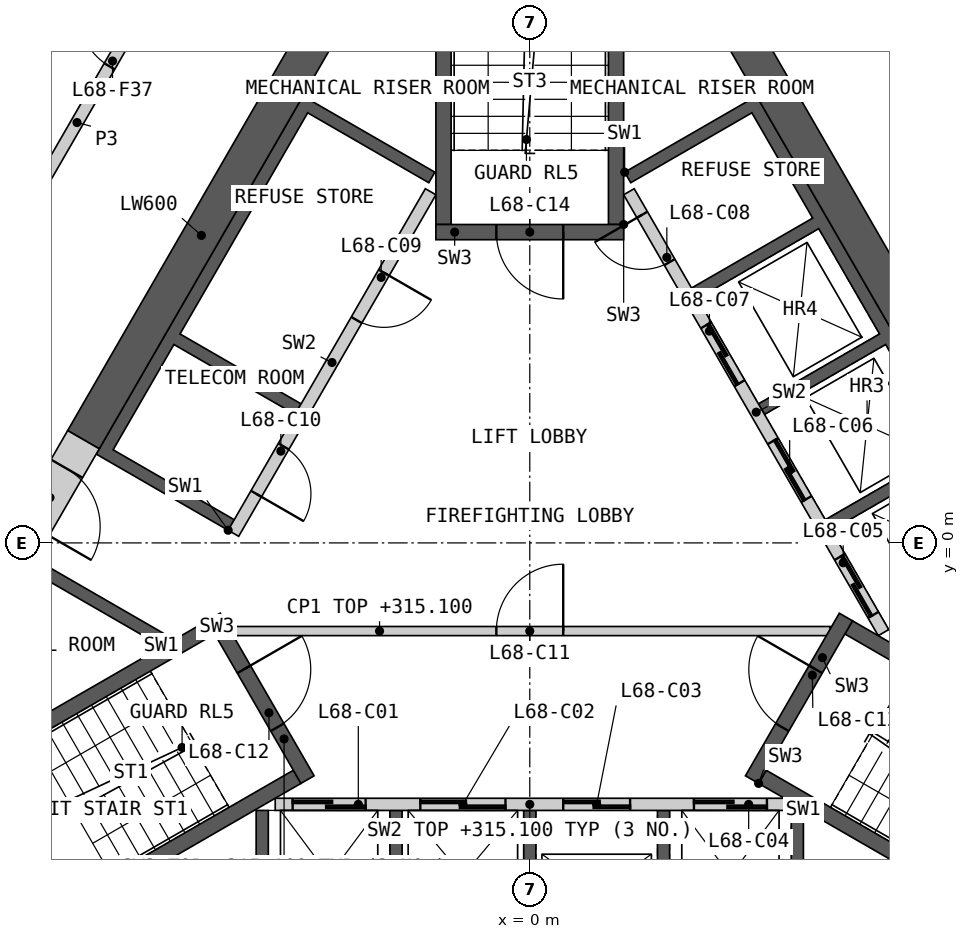
"""IFC4 building model, lengths in metres.
Left out: names, types, materials, properties, quantities, classifications, styles, units other than length and angle.
Written with IfcOpenShell. Run it as: python <this file> out.ifc"""

import sys

from ifc_helpers import new_model, si_unit, direction, frame, frame_2d, origin, place, context, subcontext, project, spatial, polyline, rectangle, outline, extrude, element, fill, save


model = new_model("IFC4")
c1 = context("Model", 3, precision=1e-05, world=origin(), true_north=direction((0.0, 1.0)))
c2 = subcontext(c1, "Body", "Model", "MODEL_VIEW")
j1 = project(units=[si_unit("LENGTHUNIT", "METRE"), si_unit("PLANEANGLEUNIT", "RADIAN")], contexts=[c1])
p1 = place(None, origin())
s1 = spatial("IfcSite", under=j1, at=p1, CompositionType="ELEMENT")
p2 = place(p1, origin())
s2 = spatial("IfcBuilding", under=s1, at=p2, CompositionType="ELEMENT")
p3 = place(p2, frame((0.0, 0.0, 312.0)))
s3 = spatial("IfcBuildingStorey", under=s2, at=p3, CompositionType="ELEMENT", Elevation=312.0)
p4 = place(p3, origin())
e1 = element("IfcWall", 1, at=p4, inside=s3, PredefinedType="SHEAR", context=c2, shape_type="SweptSolid", body=[
    extrude(outline(polyline([(4.5, -4.4), (4.5, -6.906), (-4.5, -6.906), (-4.5, -4.4), (-4.3, -4.4), (-4.3, -6.7), (-2.3, -6.7), (-2.3, -4.4), (-2.1, -4.4), (-2.1, -6.7), (-0.1, -6.7), (-0.1, -4.4), (0.1, -4.4), (0.1, -6.7), (2.1, -6.7), (2.1, -4.4), (2.3, -4.4), (2.3, -6.7), (4.3, -6.7), (4.3, -4.4), (4.5, -4.4)])), origin(), (0.0, 0.0, 1.0), 3.1),
])
p5 = place(p3, frame((-4.187, -4.3, 0.0), z_axis=(0.0, 0.0, 1.0), x_axis=(1.0, 0.0, 0.0)))
e2 = element("IfcWall", 2, at=p5, inside=s3, PredefinedType="SOLIDWALL", context=c2, shape_type="SweptSolid", body=[
    extrude(rectangle(XDim=8.373, YDim=0.2, at=frame_2d((4.187, 0.0))), origin(), (0.0, 0.0, 1.0), 3.1),
])
p6 = place(p5, frame((0.287, 0.0, 0.0)))
e3 = element("IfcOpeningElement", 3, at=p6, cuts=e2, PredefinedType="OPENING", context=c2, shape_type="SweptSolid", body=[
    extrude(rectangle(XDim=1.2, YDim=2.1, at=frame_2d((0.6, 1.05))), frame((0.0, 0.11, 0.0), z_axis=(0.0, -1.0, 0.0), x_axis=(1.0, 0.0, 0.0)), (0.0, 0.0, 1.0), 0.22),
])
p7 = place(p5, frame((2.387, 0.0, 0.0)))
e4 = element("IfcOpeningElement", 4, at=p7, cuts=e2, PredefinedType="OPENING", context=c2, shape_type="SweptSolid", body=[
    extrude(rectangle(XDim=1.4, YDim=2.1, at=frame_2d((0.7, 1.05))), frame((0.0, 0.11, 0.0), z_axis=(0.0, -1.0, 0.0), x_axis=(1.0, 0.0, 0.0)), (0.0, 0.0, 1.0), 0.22),
])
p8 = place(p5, frame((4.737, 0.0, 0.0)))
e5 = element("IfcOpeningElement", 5, at=p8, cuts=e2, PredefinedType="OPENING", context=c2, shape_type="SweptSolid", body=[
    extrude(rectangle(XDim=1.1, YDim=2.1, at=frame_2d((0.55, 1.05))), frame((0.0, 0.11, 0.0), z_axis=(0.0, -1.0, 0.0), x_axis=(1.0, 0.0, 0.0)), (0.0, 0.0, 1.0), 0.22),
])
p9 = place(p5, frame((6.887, 0.0, 0.0)))
e6 = element("IfcOpeningElement", 6, at=p9, cuts=e2, PredefinedType="OPENING", context=c2, shape_type="SweptSolid", body=[
    extrude(rectangle(XDim=1.2, YDim=2.1, at=frame_2d((0.6, 1.05))), frame((0.0, 0.11, 0.0), z_axis=(0.0, -1.0, 0.0), x_axis=(1.0, 0.0, 0.0)), (0.0, 0.0, 1.0), 0.22),
])
p10 = place(p3, origin())
e7 = element("IfcWall", 7, at=p10, inside=s3, PredefinedType="SHEAR", context=c2, shape_type="SweptSolid", body=[
    extrude(outline(polyline([(1.561, 6.097), (3.731, 7.35), (8.231, -0.444), (6.061, -1.697), (5.96, -1.524), (7.952, -0.374), (6.952, 1.358), (4.96, 0.208), (4.861, 0.381), (6.852, 1.531), (5.852, 3.263), (3.861, 2.113), (3.76, 2.287), (5.752, 3.437), (4.752, 5.169), (2.76, 4.019), (2.66, 4.192), (4.652, 5.342), (3.652, 7.074), (1.66, 5.924), (1.561, 6.097)])), origin(), (0.0, 0.0, 1.0), 3.1),
])
p11 = place(p3, frame((5.817, -1.476, 0.0), z_axis=(0.0, 0.0, 1.0), x_axis=(-0.500002616675, 0.866023893041, 0.0)))
e8 = element("IfcWall", 8, at=p11, inside=s3, PredefinedType="SOLIDWALL", context=c2, shape_type="SweptSolid", body=[
    extrude(rectangle(XDim=8.373, YDim=0.2, at=frame_2d((4.187, 0.0))), origin(), (0.0, 0.0, 1.0), 3.1),
])
p12 = place(p11, frame((0.337, 0.0, 0.0)))
e9 = element("IfcOpeningElement", 9, at=p12, cuts=e8, PredefinedType="OPENING", context=c2, shape_type="SweptSolid", body=[
    extrude(rectangle(XDim=1.1, YDim=2.1, at=frame_2d((0.55, 1.05))), frame((0.0, 0.11, 0.0), z_axis=(0.0, -1.0, 0.0), x_axis=(1.0, 0.0, 0.0)), (0.0, 0.0, 1.0), 0.22),
])
p13 = place(p11, frame((2.537, 0.0, 0.0)))
e10 = element("IfcOpeningElement", 10, at=p13, cuts=e8, PredefinedType="OPENING", context=c2, shape_type="SweptSolid", body=[
    extrude(rectangle(XDim=1.1, YDim=2.1, at=frame_2d((0.55, 1.05))), frame((0.0, 0.11, 0.0), z_axis=(0.0, -1.0, 0.0), x_axis=(1.0, 0.0, 0.0)), (0.0, 0.0, 1.0), 0.22),
])
p14 = place(p11, frame((4.737, 0.0, 0.0)))
e11 = element("IfcOpeningElement", 11, at=p14, cuts=e8, PredefinedType="OPENING", context=c2, shape_type="SweptSolid", body=[
    extrude(rectangle(XDim=1.1, YDim=2.1, at=frame_2d((0.55, 1.05))), frame((0.0, 0.11, 0.0), z_axis=(0.0, -1.0, 0.0), x_axis=(1.0, 0.0, 0.0)), (0.0, 0.0, 1.0), 0.22),
])
p15 = place(p11, frame((7.037, 0.0, 0.0)))
e12 = element("IfcOpeningElement", 12, at=p15, cuts=e8, PredefinedType="OPENING", context=c2, shape_type="SweptSolid", body=[
    extrude(rectangle(XDim=0.9, YDim=2.1, at=frame_2d((0.45, 1.05))), frame((0.0, 0.11, 0.0), z_axis=(0.0, -1.0, 0.0), x_axis=(1.0, 0.0, 0.0)), (0.0, 0.0, 1.0), 0.22),
])
p16 = place(p3, origin())
e13 = element("IfcWall", 13, at=p16, inside=s3, PredefinedType="SHEAR", context=c2, shape_type="SweptSolid", body=[
    extrude(outline(polyline([(-6.061, -1.697), (-8.231, -0.444), (-8.131, -0.271), (-5.96, -1.524), (-6.061, -1.697)])), origin(), (0.0, 0.0, 1.0), 3.1),
])
p17 = place(p3, origin())
e14 = element("IfcWall", 14, at=p17, inside=s3, PredefinedType="SHEAR", context=c2, shape_type="SweptSolid", body=[
    extrude(outline(polyline([(-4.96, 0.208), (-7.131, 1.461), (-3.731, 7.35), (-1.561, 6.097), (-1.66, 5.924), (-3.652, 7.074), (-5.752, 3.437), (-3.76, 2.287), (-3.861, 2.113), (-5.852, 3.263), (-6.852, 1.531), (-4.861, 0.381), (-4.96, 0.208)])), origin(), (0.0, 0.0, 1.0), 3.1),
])
p18 = place(p3, frame((-1.631, 5.776, 0.0), z_axis=(0.0, 0.0, 1.0), x_axis=(-0.499992876559, -0.866029516466, 0.0)))
e15 = element("IfcWall", 15, at=p18, inside=s3, PredefinedType="SOLIDWALL", context=c2, shape_type="SweptSolid", body=[
    extrude(rectangle(XDim=6.486, YDim=0.2, at=frame_2d((3.243, 0.0))), origin(), (0.0, 0.0, 1.0), 3.1),
])
p19 = place(p18, frame((1.537, 0.0, 0.0)))
e16 = element("IfcOpeningElement", 16, at=p19, cuts=e15, PredefinedType="OPENING", context=c2, shape_type="SweptSolid", body=[
    extrude(rectangle(XDim=0.9, YDim=2.1, at=frame_2d((0.45, 1.05))), frame((0.0, 0.11, 0.0), z_axis=(0.0, -1.0, 0.0), x_axis=(1.0, 0.0, 0.0)), (0.0, 0.0, 1.0), 0.22),
])
p20 = place(p18, frame((4.837, 0.0, 0.0)))
e17 = element("IfcOpeningElement", 17, at=p20, cuts=e15, PredefinedType="OPENING", context=c2, shape_type="SweptSolid", body=[
    extrude(rectangle(XDim=0.9, YDim=2.1, at=frame_2d((0.45, 1.05))), frame((0.0, 0.11, 0.0), z_axis=(0.0, -1.0, 0.0), x_axis=(1.0, 0.0, 0.0)), (0.0, 0.0, 1.0), 0.22),
])
p21 = place(p3, frame((-4.941, -1.45, 0.0), z_axis=(0.0, 0.0, 1.0), x_axis=(1.0, 0.0, 0.0)))
e18 = element("IfcWall", 18, at=p21, inside=s3, PredefinedType="PARTITIONING", context=c2, shape_type="SweptSolid", body=[
    extrude(rectangle(XDim=9.882, YDim=0.15, at=frame_2d((4.941, 0.0))), origin(), (0.0, 0.0, 1.0), 3.1),
])
p22 = place(p21, frame((4.391, 0.0, 0.0)))
e19 = element("IfcOpeningElement", 19, at=p22, cuts=e18, PredefinedType="OPENING", context=c2, shape_type="SweptSolid", body=[
    extrude(rectangle(XDim=1.1, YDim=2.1, at=frame_2d((0.55, 1.05))), frame((0.0, 0.085, 0.0), z_axis=(0.0, -1.0, 0.0), x_axis=(1.0, 0.0, 0.0)), (0.0, 0.0, 1.0), 0.17),
])
p23 = place(p3, origin())
e20 = element("IfcWall", 20, at=p23, inside=s3, PredefinedType="SHEAR", context=c2, shape_type="SweptSolid", body=[
    extrude(outline(polyline([(-5.307, -1.281), (-10.374, -4.206), (-10.032, -4.298), (-5.182, -1.498), (-5.307, -1.281)])), origin(), (0.0, 0.0, 1.0), 3.1),
])
p24 = place(p3, origin())
e21 = element("IfcWall", 21, at=p24, inside=s3, PredefinedType="SHEAR", context=c2, shape_type="SweptSolid", body=[
    extrude(outline(polyline([(-8.738, -6.539), (-8.83, -6.881), (-3.763, -3.956), (-3.888, -3.739), (-8.738, -6.539)])), origin(), (0.0, 0.0, 1.0), 3.1),
])
p25 = place(p3, frame((-5.199, -1.219, 0.0), z_axis=(0.0, 0.0, 1.0), x_axis=(0.499982516597, -0.866035497597, 0.0)))
e22 = element("IfcWall", 22, at=p25, inside=s3, PredefinedType="SHEAR", context=c2, shape_type="SweptSolid", body=[
    extrude(rectangle(XDim=3.088, YDim=0.25, at=frame_2d((1.544, 0.0))), origin(), (0.0, 0.0, 1.0), 3.1),
])
p26 = place(p25, frame((0.994, 0.0, 0.0)))
e23 = element("IfcOpeningElement", 23, at=p26, cuts=e22, PredefinedType="OPENING", context=c2, shape_type="SweptSolid", body=[
    extrude(rectangle(XDim=1.1, YDim=2.1, at=frame_2d((0.55, 1.05))), frame((0.0, 0.135, 0.0), z_axis=(0.0, -1.0, 0.0), x_axis=(1.0, 0.0, 0.0)), (0.0, 0.0, 1.0), 0.27),
])
p27 = place(p3, origin())
e24 = element("IfcWall", 24, at=p27, inside=s3, PredefinedType="SHEAR", context=c2, shape_type="SweptSolid", body=[
    extrude(outline(polyline([(3.763, -3.956), (8.83, -6.881), (8.738, -6.539), (3.888, -3.739), (3.763, -3.956)])), origin(), (0.0, 0.0, 1.0), 3.1),
])
p28 = place(p3, origin())
e25 = element("IfcWall", 25, at=p28, inside=s3, PredefinedType="SHEAR", context=c2, shape_type="SweptSolid", body=[
    extrude(outline(polyline([(10.032, -4.298), (10.374, -4.206), (5.307, -1.281), (5.182, -1.498), (10.032, -4.298)])), origin(), (0.0, 0.0, 1.0), 3.1),
])
p29 = place(p3, frame((3.655, -3.893, 0.0), z_axis=(0.0, 0.0, 1.0), x_axis=(0.499982516597, 0.866035497597, 0.0)))
e26 = element("IfcWall", 26, at=p29, inside=s3, PredefinedType="SHEAR", context=c2, shape_type="SweptSolid", body=[
    extrude(rectangle(XDim=3.088, YDim=0.25, at=frame_2d((1.544, 0.0))), origin(), (0.0, 0.0, 1.0), 3.1),
])
p30 = place(p29, frame((0.994, 0.0, 0.0)))
e27 = element("IfcOpeningElement", 27, at=p30, cuts=e26, PredefinedType="OPENING", context=c2, shape_type="SweptSolid", body=[
    extrude(rectangle(XDim=1.1, YDim=2.1, at=frame_2d((0.55, 1.05))), frame((0.0, 0.135, 0.0), z_axis=(0.0, -1.0, 0.0), x_axis=(1.0, 0.0, 0.0)), (0.0, 0.0, 1.0), 0.27),
])
p31 = place(p3, origin())
e28 = element("IfcWall", 28, at=p31, inside=s3, PredefinedType="SHEAR", context=c2, shape_type="SweptSolid", body=[
    extrude(outline(polyline([(1.544, 5.237), (1.544, 11.087), (1.294, 10.837), (1.294, 5.237), (1.544, 5.237)])), origin(), (0.0, 0.0, 1.0), 3.1),
])
p32 = place(p3, origin())
e29 = element("IfcWall", 29, at=p32, inside=s3, PredefinedType="SHEAR", context=c2, shape_type="SweptSolid", body=[
    extrude(outline(polyline([(-1.294, 10.837), (-1.544, 11.087), (-1.544, 5.237), (-1.294, 5.237), (-1.294, 10.837)])), origin(), (0.0, 0.0, 1.0), 3.1),
])
p33 = place(p3, frame((1.544, 5.112, 0.0), z_axis=(0.0, 0.0, 1.0), x_axis=(-1.0, 0.0, 0.0)))
e30 = element("IfcWall", 30, at=p33, inside=s3, PredefinedType="SHEAR", context=c2, shape_type="SweptSolid", body=[
    extrude(rectangle(XDim=3.088, YDim=0.25, at=frame_2d((1.544, 0.0))), origin(), (0.0, 0.0, 1.0), 3.1),
])
p34 = place(p33, frame((0.994, 0.0, 0.0)))
e31 = element("IfcOpeningElement", 31, at=p34, cuts=e30, PredefinedType="OPENING", context=c2, shape_type="SweptSolid", body=[
    extrude(rectangle(XDim=1.1, YDim=2.1, at=frame_2d((0.55, 1.05))), frame((0.0, 0.135, 0.0), z_axis=(0.0, -1.0, 0.0), x_axis=(1.0, 0.0, 0.0)), (0.0, 0.0, 1.0), 0.27),
])
p35 = place(p3, frame((8.686, -0.634, 0.0), z_axis=(0.0, 0.0, 1.0), x_axis=(-0.50001836461, 0.866014800712, 0.0)))
e32 = element("IfcWall", 32, at=p35, inside=s3, PredefinedType="SHEAR", context=c2, shape_type="SweptSolid", body=[
    extrude(rectangle(XDim=10.451, YDim=0.6, at=frame_2d((5.225, 0.0))), origin(), (0.0, 0.0, 1.0), 3.1),
])
p36 = place(p3, frame((-3.461, 8.417, 0.0), z_axis=(0.0, 0.0, 1.0), x_axis=(-0.50000391502, -0.866023143435, 0.0)))
e33 = element("IfcWall", 33, at=p36, inside=s3, PredefinedType="SHEAR", context=c2, shape_type="SweptSolid", body=[
    extrude(rectangle(XDim=7.759, YDim=0.6, at=frame_2d((3.879, 0.0))), origin(), (0.0, 0.0, 1.0), 3.1),
])
p37 = place(p3, frame((-7.34, 1.698, 0.0), z_axis=(0.0, 0.0, 1.0), x_axis=(-0.50002983664, -0.866008176907, 0.0)))
e34 = element("IfcWall", 34, at=p37, inside=s3, PredefinedType="SHEAR", context=c2, shape_type="SweptSolid", body=[
    extrude(rectangle(XDim=2.2, YDim=0.6, at=frame_2d((1.1, 0.0))), origin(), (0.0, 0.0, 1.0), 3.1),
])
p38 = place(p37, frame((0.55, 0.0, 0.0)))
e35 = element("IfcOpeningElement", 35, at=p38, cuts=e34, PredefinedType="OPENING", context=c2, shape_type="SweptSolid", body=[
    extrude(rectangle(XDim=1.1, YDim=2.1, at=frame_2d((0.55, 1.05))), frame((0.0, 0.31, 0.0), z_axis=(0.0, -1.0, 0.0), x_axis=(1.0, 0.0, 0.0)), (0.0, 0.0, 1.0), 0.62),
])
p39 = place(p3, frame((-8.458, 5.16, 0.0), z_axis=(0.0, 0.0, 1.0), x_axis=(0.499984266882, 0.866034487114, 0.0)))
e36 = element("IfcWall", 36, at=p39, inside=s3, PredefinedType="PARTITIONING", context=c2, shape_type="SweptSolid", body=[
    extrude(rectangle(XDim=8.099, YDim=0.2, at=frame_2d((4.049, 0.0))), origin(), (0.0, 0.0, 1.0), 3.1),
])
p40 = place(p39, frame((3.093, 0.0, 0.0)))
e37 = element("IfcOpeningElement", 37, at=p40, cuts=e36, PredefinedType="OPENING", context=c2, shape_type="SweptSolid", body=[
    extrude(rectangle(XDim=1.0, YDim=2.1, at=frame_2d((0.5, 1.05))), frame((0.0, 0.11, 0.0), z_axis=(0.0, -1.0, 0.0), x_axis=(1.0, 0.0, 0.0)), (0.0, 0.0, 1.0), 0.22),
])
p41 = place(p3, frame((4.409, 12.174, 0.0), z_axis=(0.0, 0.0, 1.0), x_axis=(0.499984266882, -0.866034487114, 0.0)))
e38 = element("IfcWall", 38, at=p41, inside=s3, PredefinedType="PARTITIONING", context=c2, shape_type="SweptSolid", body=[
    extrude(rectangle(XDim=8.099, YDim=0.2, at=frame_2d((4.049, 0.0))), origin(), (0.0, 0.0, 1.0), 3.1),
])
p42 = place(p41, frame((3.905, 0.0, 0.0)))
e39 = element("IfcOpeningElement", 39, at=p42, cuts=e38, PredefinedType="OPENING", context=c2, shape_type="SweptSolid", body=[
    extrude(rectangle(XDim=1.0, YDim=2.1, at=frame_2d((0.5, 1.05))), frame((0.0, 0.11, 0.0), z_axis=(0.0, -1.0, 0.0), x_axis=(1.0, 0.0, 0.0)), (0.0, 0.0, 1.0), 0.22),
])
p43 = place(p6, origin())
e40 = element("IfcDoor", 40, at=p43, inside=s3, OperationType="SLIDING_TO_LEFT", PredefinedType="DOOR", context=c2, shape_type="SweptSolid", body=[
    extrude(rectangle(XDim=1.2, YDim=2.1, at=frame_2d((0.6, 1.05))), frame((0.0, 0.025, 0.0), z_axis=(0.0, -1.0, 0.0), x_axis=(1.0, 0.0, 0.0)), (0.0, 0.0, 1.0), 0.05),
])
fill(e3, e40)
p44 = place(p7, origin())
e41 = element("IfcDoor", 41, at=p44, inside=s3, OperationType="SLIDING_TO_LEFT", PredefinedType="DOOR", context=c2, shape_type="SweptSolid", body=[
    extrude(rectangle(XDim=1.4, YDim=2.1, at=frame_2d((0.7, 1.05))), frame((0.0, 0.025, 0.0), z_axis=(0.0, -1.0, 0.0), x_axis=(1.0, 0.0, 0.0)), (0.0, 0.0, 1.0), 0.05),
])
fill(e4, e41)
p45 = place(p8, origin())
e42 = element("IfcDoor", 42, at=p45, inside=s3, OperationType="SLIDING_TO_LEFT", PredefinedType="DOOR", context=c2, shape_type="SweptSolid", body=[
    extrude(rectangle(XDim=1.1, YDim=2.1, at=frame_2d((0.55, 1.05))), frame((0.0, 0.025, 0.0), z_axis=(0.0, -1.0, 0.0), x_axis=(1.0, 0.0, 0.0)), (0.0, 0.0, 1.0), 0.05),
])
fill(e5, e42)
p46 = place(p9, origin())
e43 = element("IfcDoor", 43, at=p46, inside=s3, OperationType="SLIDING_TO_LEFT", PredefinedType="DOOR", context=c2, shape_type="SweptSolid", body=[
    extrude(rectangle(XDim=1.2, YDim=2.1, at=frame_2d((0.6, 1.05))), frame((0.0, 0.025, 0.0), z_axis=(0.0, -1.0, 0.0), x_axis=(1.0, 0.0, 0.0)), (0.0, 0.0, 1.0), 0.05),
])
fill(e6, e43)
p47 = place(p12, origin())
e44 = element("IfcDoor", 44, at=p47, inside=s3, OperationType="SLIDING_TO_LEFT", PredefinedType="DOOR", context=c2, shape_type="SweptSolid", body=[
    extrude(rectangle(XDim=1.1, YDim=2.1, at=frame_2d((0.55, 1.05))), frame((0.0, 0.025, 0.0), z_axis=(0.0, -1.0, 0.0), x_axis=(1.0, 0.0, 0.0)), (0.0, 0.0, 1.0), 0.05),
])
fill(e9, e44)
p48 = place(p13, origin())
e45 = element("IfcDoor", 45, at=p48, inside=s3, OperationType="SLIDING_TO_LEFT", PredefinedType="DOOR", context=c2, shape_type="SweptSolid", body=[
    extrude(rectangle(XDim=1.1, YDim=2.1, at=frame_2d((0.55, 1.05))), frame((0.0, 0.025, 0.0), z_axis=(0.0, -1.0, 0.0), x_axis=(1.0, 0.0, 0.0)), (0.0, 0.0, 1.0), 0.05),
])
fill(e10, e45)
p49 = place(p14, origin())
e46 = element("IfcDoor", 46, at=p49, inside=s3, OperationType="SLIDING_TO_LEFT", PredefinedType="DOOR", context=c2, shape_type="SweptSolid", body=[
    extrude(rectangle(XDim=1.1, YDim=2.1, at=frame_2d((0.55, 1.05))), frame((0.0, 0.025, 0.0), z_axis=(0.0, -1.0, 0.0), x_axis=(1.0, 0.0, 0.0)), (0.0, 0.0, 1.0), 0.05),
])
fill(e11, e46)
p50 = place(p15, origin())
e47 = element("IfcDoor", 47, at=p50, inside=s3, OperationType="SINGLE_SWING_RIGHT", PredefinedType="DOOR", context=c2, shape_type="SweptSolid", body=[
    extrude(rectangle(XDim=0.9, YDim=2.1, at=frame_2d((0.45, 1.05))), frame((0.0, 0.025, 0.0), z_axis=(0.0, -1.0, 0.0), x_axis=(1.0, 0.0, 0.0)), (0.0, 0.0, 1.0), 0.05),
])
fill(e12, e47)
p51 = place(p19, origin())
e48 = element("IfcDoor", 48, at=p51, inside=s3, OperationType="SINGLE_SWING_LEFT", PredefinedType="DOOR", context=c2, shape_type="SweptSolid", body=[
    extrude(rectangle(XDim=0.9, YDim=2.1, at=frame_2d((0.45, 1.05))), frame((0.0, 0.025, 0.0), z_axis=(0.0, -1.0, 0.0), x_axis=(1.0, 0.0, 0.0)), (0.0, 0.0, 1.0), 0.05),
])
fill(e16, e48)
p52 = place(p20, origin())
e49 = element("IfcDoor", 49, at=p52, inside=s3, OperationType="SINGLE_SWING_RIGHT", PredefinedType="DOOR", context=c2, shape_type="SweptSolid", body=[
    extrude(rectangle(XDim=0.9, YDim=2.1, at=frame_2d((0.45, 1.05))), frame((0.0, 0.025, 0.0), z_axis=(0.0, -1.0, 0.0), x_axis=(1.0, 0.0, 0.0)), (0.0, 0.0, 1.0), 0.05),
])
fill(e17, e49)
p53 = place(p22, origin())
e50 = element("IfcDoor", 50, at=p53, inside=s3, OperationType="SINGLE_SWING_RIGHT", PredefinedType="DOOR", context=c2, shape_type="SweptSolid", body=[
    extrude(rectangle(XDim=1.1, YDim=2.1, at=frame_2d((0.55, 1.05))), frame((0.0, 0.025, 0.0), z_axis=(0.0, -1.0, 0.0), x_axis=(1.0, 0.0, 0.0)), (0.0, 0.0, 1.0), 0.05),
])
fill(e19, e50)
p54 = place(p26, origin())
e51 = element("IfcDoor", 51, at=p54, inside=s3, OperationType="SINGLE_SWING_LEFT", PredefinedType="DOOR", context=c2, shape_type="SweptSolid", body=[
    extrude(rectangle(XDim=1.1, YDim=2.1, at=frame_2d((0.55, 1.05))), frame((0.0, 0.025, 0.0), z_axis=(0.0, -1.0, 0.0), x_axis=(1.0, 0.0, 0.0)), (0.0, 0.0, 1.0), 0.05),
])
fill(e23, e51)
p55 = place(p30, origin())
e52 = element("IfcDoor", 52, at=p55, inside=s3, OperationType="SINGLE_SWING_RIGHT", PredefinedType="DOOR", context=c2, shape_type="SweptSolid", body=[
    extrude(rectangle(XDim=1.1, YDim=2.1, at=frame_2d((0.55, 1.05))), frame((0.0, 0.025, 0.0), z_axis=(0.0, -1.0, 0.0), x_axis=(1.0, 0.0, 0.0)), (0.0, 0.0, 1.0), 0.05),
])
fill(e27, e52)
p56 = place(p34, origin())
e53 = element("IfcDoor", 53, at=p56, inside=s3, OperationType="SINGLE_SWING_LEFT", PredefinedType="DOOR", context=c2, shape_type="SweptSolid", body=[
    extrude(rectangle(XDim=1.1, YDim=2.1, at=frame_2d((0.55, 1.05))), frame((0.0, 0.025, 0.0), z_axis=(0.0, -1.0, 0.0), x_axis=(1.0, 0.0, 0.0)), (0.0, 0.0, 1.0), 0.05),
])
fill(e31, e53)
p57 = place(p38, origin())
e54 = element("IfcDoor", 54, at=p57, inside=s3, OperationType="SINGLE_SWING_RIGHT", PredefinedType="DOOR", context=c2, shape_type="SweptSolid", body=[
    extrude(rectangle(XDim=1.1, YDim=2.1, at=frame_2d((0.55, 1.05))), frame((0.0, 0.055, 0.0), z_axis=(0.0, -1.0, 0.0), x_axis=(1.0, 0.0, 0.0)), (0.0, 0.0, 1.0), 0.05),
])
fill(e35, e54)
p58 = place(p40, origin())
e55 = element("IfcDoor", 55, at=p58, inside=s3, OperationType="SINGLE_SWING_RIGHT", PredefinedType="DOOR", context=c2, shape_type="SweptSolid", body=[
    extrude(rectangle(XDim=1.0, YDim=2.1, at=frame_2d((0.5, 1.05))), frame((0.0, 0.025, 0.0), z_axis=(0.0, -1.0, 0.0), x_axis=(1.0, 0.0, 0.0)), (0.0, 0.0, 1.0), 0.05),
])
fill(e37, e55)
save(model, sys.argv[1])
